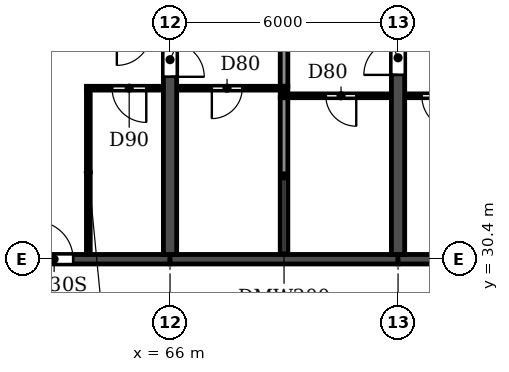
"""IFC4 building model, lengths in metres.
Left out: names, types, materials, properties, quantities, classifications, styles, units other than length and angle.
Written with IfcOpenShell. Run it as: python <this file> out.ifc"""

import sys

from ifc_helpers import new_model, si_unit, direction, frame, frame_2d, origin, place, context, subcontext, project, spatial, rectangle, extrude, element, fill, save


model = new_model("IFC4")
c1 = context("Model", 3, precision=1e-05, world=origin(), true_north=direction((0.0, 1.0)))
c2 = subcontext(c1, "Body", "Model", "MODEL_VIEW")
j1 = project(units=[si_unit("LENGTHUNIT", "METRE"), si_unit("PLANEANGLEUNIT", "RADIAN")], contexts=[c1])
p1 = place(None, origin())
s1 = spatial("IfcSite", under=j1, at=p1, CompositionType="ELEMENT")
p2 = place(p1, origin())
s2 = spatial("IfcBuilding", under=s1, at=p2, CompositionType="ELEMENT")
p3 = place(p2, frame((0.0, 0.0, 82.8)))
s3 = spatial("IfcBuildingStorey", under=s2, at=p3, CompositionType="ELEMENT", Elevation=82.8)
p4 = place(p3, frame((66.0, 30.525, 0.0), z_axis=(0.0, 0.0, 1.0), x_axis=(0.0, 1.0, 0.0)))
e1 = element("IfcWall", 1, at=p4, inside=s3, PredefinedType="SHEAR", context=c2, shape_type="SweptSolid", body=[
    extrude(rectangle(XDim=12.875, YDim=0.35, at=frame_2d((6.438, 0.0))), origin(), (0.0, 0.0, 1.0), 3.06),
])
p5 = place(p4, frame((4.675, 0.0, 0.0)))
e2 = element("IfcOpeningElement", 2, at=p5, cuts=e1, PredefinedType="OPENING", context=c2, shape_type="SweptSolid", body=[
    extrude(rectangle(XDim=0.9, YDim=2.1, at=frame_2d((0.45, 1.05))), frame((0.0, 0.185, 0.0), z_axis=(0.0, -1.0, 0.0), x_axis=(1.0, 0.0, 0.0)), (0.0, 0.0, 1.0), 0.37),
])
p6 = place(p3, frame((72.0, 30.525, 0.0), z_axis=(0.0, 0.0, 1.0), x_axis=(0.0, 1.0, 0.0)))
e3 = element("IfcWall", 3, at=p6, inside=s3, PredefinedType="SHEAR", context=c2, shape_type="SweptSolid", body=[
    extrude(rectangle(XDim=12.875, YDim=0.35, at=frame_2d((6.438, 0.0))), origin(), (0.0, 0.0, 1.0), 3.06),
])
p7 = place(p6, frame((4.725, 0.0, 0.0)))
e4 = element("IfcOpeningElement", 4, at=p7, cuts=e3, PredefinedType="OPENING", context=c2, shape_type="SweptSolid", body=[
    extrude(rectangle(XDim=0.9, YDim=2.1, at=frame_2d((0.45, 1.05))), frame((0.0, 0.185, 0.0), z_axis=(0.0, -1.0, 0.0), x_axis=(1.0, 0.0, 0.0)), (0.0, 0.0, 1.0), 0.37),
])
p8 = place(p3, frame((60.0, 30.4, 0.0), z_axis=(0.0, 0.0, 1.0), x_axis=(1.0, 0.0, 0.0)))
e5 = element("IfcWall", 5, at=p8, inside=s3, PredefinedType="SHEAR", context=c2, shape_type="SweptSolid", body=[
    extrude(rectangle(XDim=6.0, YDim=0.25, at=frame_2d((3.0, 0.0))), origin(), (0.0, 0.0, 1.0), 2.46),
])
p9 = place(p8, frame((2.45, 0.0, 0.0)))
e6 = element("IfcOpeningElement", 6, at=p9, cuts=e5, PredefinedType="OPENING", context=c2, shape_type="SweptSolid", body=[
    extrude(rectangle(XDim=1.0, YDim=2.1, at=frame_2d((0.5, 1.05))), frame((0.0, 0.135, 0.0), z_axis=(0.0, -1.0, 0.0), x_axis=(1.0, 0.0, 0.0)), (0.0, 0.0, 1.0), 0.27),
])
p10 = place(p3, frame((66.0, 30.4, 0.0), z_axis=(0.0, 0.0, 1.0), x_axis=(1.0, 0.0, 0.0)))
e7 = element("IfcWall", 7, at=p10, inside=s3, PredefinedType="SHEAR", context=c2, shape_type="SweptSolid", body=[
    extrude(rectangle(XDim=6.0, YDim=0.25, at=frame_2d((3.0, 0.0))), origin(), (0.0, 0.0, 1.0), 2.46),
])
p11 = place(p3, frame((72.0, 30.4, 0.0), z_axis=(0.0, 0.0, 1.0), x_axis=(1.0, 0.0, 0.0)))
e8 = element("IfcWall", 8, at=p11, inside=s3, PredefinedType="SHEAR", context=c2, shape_type="SweptSolid", body=[
    extrude(rectangle(XDim=6.0, YDim=0.25, at=frame_2d((3.0, 0.0))), origin(), (0.0, 0.0, 1.0), 2.46),
])
p12 = place(p11, frame((2.55, 0.0, 0.0)))
e9 = element("IfcOpeningElement", 9, at=p12, cuts=e8, PredefinedType="OPENING", context=c2, shape_type="SweptSolid", body=[
    extrude(rectangle(XDim=1.0, YDim=2.1, at=frame_2d((0.5, 1.05))), frame((0.0, 0.135, 0.0), z_axis=(0.0, -1.0, 0.0), x_axis=(1.0, 0.0, 0.0)), (0.0, 0.0, 1.0), 0.27),
])
p13 = place(p3, frame((69.0, 30.535, 0.0), z_axis=(0.0, 0.0, 1.0), x_axis=(0.0, 1.0, 0.0)))
e10 = element("IfcWall", 10, at=p13, inside=s3, PredefinedType="PARTITIONING", context=c2, shape_type="SweptSolid", body=[
    extrude(rectangle(XDim=4.115, YDim=0.2, at=frame_2d((2.058, 0.0))), origin(), (0.0, 0.0, 1.0), 3.06),
])
p14 = place(p3, frame((69.0, 34.95, 0.0), z_axis=(0.0, 0.0, 1.0), x_axis=(0.0, 1.0, 0.0)))
e11 = element("IfcWall", 11, at=p14, inside=s3, PredefinedType="PARTITIONING", context=c2, shape_type="SweptSolid", body=[
    extrude(rectangle(XDim=8.59, YDim=0.2, at=frame_2d((4.295, 0.0))), origin(), (0.0, 0.0, 1.0), 3.06),
])
p15 = place(p3, frame((68.9, 34.7, 0.0), z_axis=(0.0, 0.0, 1.0), x_axis=(1.0, 0.0, 0.0)))
e12 = element("IfcWall", 12, at=p15, inside=s3, PredefinedType="PARTITIONING", context=c2, shape_type="SweptSolid", body=[
    extrude(rectangle(XDim=2.915, YDim=0.1, at=frame_2d((1.458, 0.0))), origin(), (0.0, 0.0, 1.0), 3.06),
])
p16 = place(p15, frame((1.2, 0.0, 0.0)))
e13 = element("IfcOpeningElement", 13, at=p16, cuts=e12, PredefinedType="OPENING", context=c2, shape_type="SweptSolid", body=[
    extrude(rectangle(XDim=0.8, YDim=2.1, at=frame_2d((0.4, 1.05))), frame((0.0, 0.06, 0.0), z_axis=(0.0, -1.0, 0.0), x_axis=(1.0, 0.0, 0.0)), (0.0, 0.0, 1.0), 0.12),
])
p17 = place(p3, frame((72.185, 34.7, 0.0), z_axis=(0.0, 0.0, 1.0), x_axis=(1.0, 0.0, 0.0)))
e14 = element("IfcWall", 14, at=p17, inside=s3, PredefinedType="PARTITIONING", context=c2, shape_type="SweptSolid", body=[
    extrude(rectangle(XDim=2.015, YDim=0.1, at=frame_2d((1.007, 0.0))), origin(), (0.0, 0.0, 1.0), 3.06),
])
p18 = place(p17, frame((0.44, 0.0, 0.0)))
e15 = element("IfcOpeningElement", 15, at=p18, cuts=e14, PredefinedType="OPENING", context=c2, shape_type="SweptSolid", body=[
    extrude(rectangle(XDim=0.9, YDim=2.1, at=frame_2d((0.45, 1.05))), frame((0.0, 0.06, 0.0), z_axis=(0.0, -1.0, 0.0), x_axis=(1.0, 0.0, 0.0)), (0.0, 0.0, 1.0), 0.12),
])
p19 = place(p3, frame((63.8, 34.9, 0.0), z_axis=(0.0, 0.0, 1.0), x_axis=(1.0, 0.0, 0.0)))
e16 = element("IfcWall", 16, at=p19, inside=s3, PredefinedType="PARTITIONING", context=c2, shape_type="SweptSolid", body=[
    extrude(rectangle(XDim=2.015, YDim=0.1, at=frame_2d((1.007, 0.0))), origin(), (0.0, 0.0, 1.0), 3.06),
])
p20 = place(p19, frame((0.675, 0.0, 0.0)))
e17 = element("IfcOpeningElement", 17, at=p20, cuts=e16, PredefinedType="OPENING", context=c2, shape_type="SweptSolid", body=[
    extrude(rectangle(XDim=0.9, YDim=2.1, at=frame_2d((0.45, 1.05))), frame((0.0, 0.06, 0.0), z_axis=(0.0, -1.0, 0.0), x_axis=(1.0, 0.0, 0.0)), (0.0, 0.0, 1.0), 0.12),
])
p21 = place(p3, frame((66.185, 34.9, 0.0), z_axis=(0.0, 0.0, 1.0), x_axis=(1.0, 0.0, 0.0)))
e18 = element("IfcWall", 18, at=p21, inside=s3, PredefinedType="PARTITIONING", context=c2, shape_type="SweptSolid", body=[
    extrude(rectangle(XDim=2.915, YDim=0.1, at=frame_2d((1.458, 0.0))), origin(), (0.0, 0.0, 1.0), 3.06),
])
p22 = place(p21, frame((0.915, 0.0, 0.0)))
e19 = element("IfcOpeningElement", 19, at=p22, cuts=e18, PredefinedType="OPENING", context=c2, shape_type="SweptSolid", body=[
    extrude(rectangle(XDim=0.8, YDim=2.1, at=frame_2d((0.4, 1.05))), frame((0.0, 0.06, 0.0), z_axis=(0.0, -1.0, 0.0), x_axis=(1.0, 0.0, 0.0)), (0.0, 0.0, 1.0), 0.12),
])
p23 = place(p3, frame((63.85, 30.535, 0.0), z_axis=(0.0, 0.0, 1.0), x_axis=(0.0, 1.0, 0.0)))
e20 = element("IfcWall", 20, at=p23, inside=s3, PredefinedType="PARTITIONING", context=c2, shape_type="SweptSolid", body=[
    extrude(rectangle(XDim=4.315, YDim=0.1, at=frame_2d((2.158, 0.0))), origin(), (0.0, 0.0, 1.0), 3.06),
])
p24 = place(p22, frame((0.8, 0.0, 0.0), z_axis=(0.0, 0.0, 1.0), x_axis=(-1.0, 0.0, 0.0)))
e21 = element("IfcDoor", 21, at=p24, inside=s3, OperationType="SINGLE_SWING_RIGHT", PredefinedType="DOOR", context=c2, shape_type="SweptSolid", body=[
    extrude(rectangle(XDim=0.8, YDim=2.1, at=frame_2d((0.4, 1.05))), frame((0.0, 0.025, 0.0), z_axis=(0.0, -1.0, 0.0), x_axis=(1.0, 0.0, 0.0)), (0.0, 0.0, 1.0), 0.05),
])
fill(e19, e21)
p25 = place(p9, origin())
e22 = element("IfcDoor", 22, at=p25, inside=s3, OperationType="SINGLE_SWING_LEFT", PredefinedType="DOOR", context=c2, shape_type="SweptSolid", body=[
    extrude(rectangle(XDim=1.0, YDim=2.1, at=frame_2d((0.5, 1.05))), frame((0.0, 0.025, 0.0), z_axis=(0.0, -1.0, 0.0), x_axis=(1.0, 0.0, 0.0)), (0.0, 0.0, 1.0), 0.05),
])
fill(e6, e22)
p26 = place(p20, frame((0.9, 0.0, 0.0), z_axis=(0.0, 0.0, 1.0), x_axis=(-1.0, 0.0, 0.0)))
e23 = element("IfcDoor", 23, at=p26, inside=s3, OperationType="SINGLE_SWING_LEFT", PredefinedType="DOOR", context=c2, shape_type="SweptSolid", body=[
    extrude(rectangle(XDim=0.9, YDim=2.1, at=frame_2d((0.45, 1.05))), frame((0.0, 0.025, 0.0), z_axis=(0.0, -1.0, 0.0), x_axis=(1.0, 0.0, 0.0)), (0.0, 0.0, 1.0), 0.05),
])
fill(e17, e23)
p27 = place(p5, frame((0.9, 0.0, 0.0), z_axis=(0.0, 0.0, 1.0), x_axis=(-1.0, 0.0, 0.0)))
e24 = element("IfcDoor", 24, at=p27, inside=s3, OperationType="SINGLE_SWING_RIGHT", PredefinedType="DOOR", context=c2, shape_type="SweptSolid", body=[
    extrude(rectangle(XDim=0.9, YDim=2.1, at=frame_2d((0.45, 1.05))), frame((0.0, 0.025, 0.0), z_axis=(0.0, -1.0, 0.0), x_axis=(1.0, 0.0, 0.0)), (0.0, 0.0, 1.0), 0.05),
])
fill(e2, e24)
p28 = place(p16, frame((0.8, 0.0, 0.0), z_axis=(0.0, 0.0, 1.0), x_axis=(-1.0, 0.0, 0.0)))
e25 = element("IfcDoor", 25, at=p28, inside=s3, OperationType="SINGLE_SWING_LEFT", PredefinedType="DOOR", context=c2, shape_type="SweptSolid", body=[
    extrude(rectangle(XDim=0.8, YDim=2.1, at=frame_2d((0.4, 1.05))), frame((0.0, 0.025, 0.0), z_axis=(0.0, -1.0, 0.0), x_axis=(1.0, 0.0, 0.0)), (0.0, 0.0, 1.0), 0.05),
])
fill(e13, e25)
p29 = place(p7, origin())
e26 = element("IfcDoor", 26, at=p29, inside=s3, OperationType="SINGLE_SWING_LEFT", PredefinedType="DOOR", context=c2, shape_type="SweptSolid", body=[
    extrude(rectangle(XDim=0.9, YDim=2.1, at=frame_2d((0.45, 1.05))), frame((0.0, 0.025, 0.0), z_axis=(0.0, -1.0, 0.0), x_axis=(1.0, 0.0, 0.0)), (0.0, 0.0, 1.0), 0.05),
])
fill(e4, e26)
p30 = place(p18, frame((0.9, 0.0, 0.0), z_axis=(0.0, 0.0, 1.0), x_axis=(-1.0, 0.0, 0.0)))
e27 = element("IfcDoor", 27, at=p30, inside=s3, OperationType="SINGLE_SWING_LEFT", PredefinedType="DOOR", context=c2, shape_type="SweptSolid", body=[
    extrude(rectangle(XDim=0.9, YDim=2.1, at=frame_2d((0.45, 1.05))), frame((0.0, 0.025, 0.0), z_axis=(0.0, -1.0, 0.0), x_axis=(1.0, 0.0, 0.0)), (0.0, 0.0, 1.0), 0.05),
])
fill(e15, e27)
save(model, sys.argv[1])
